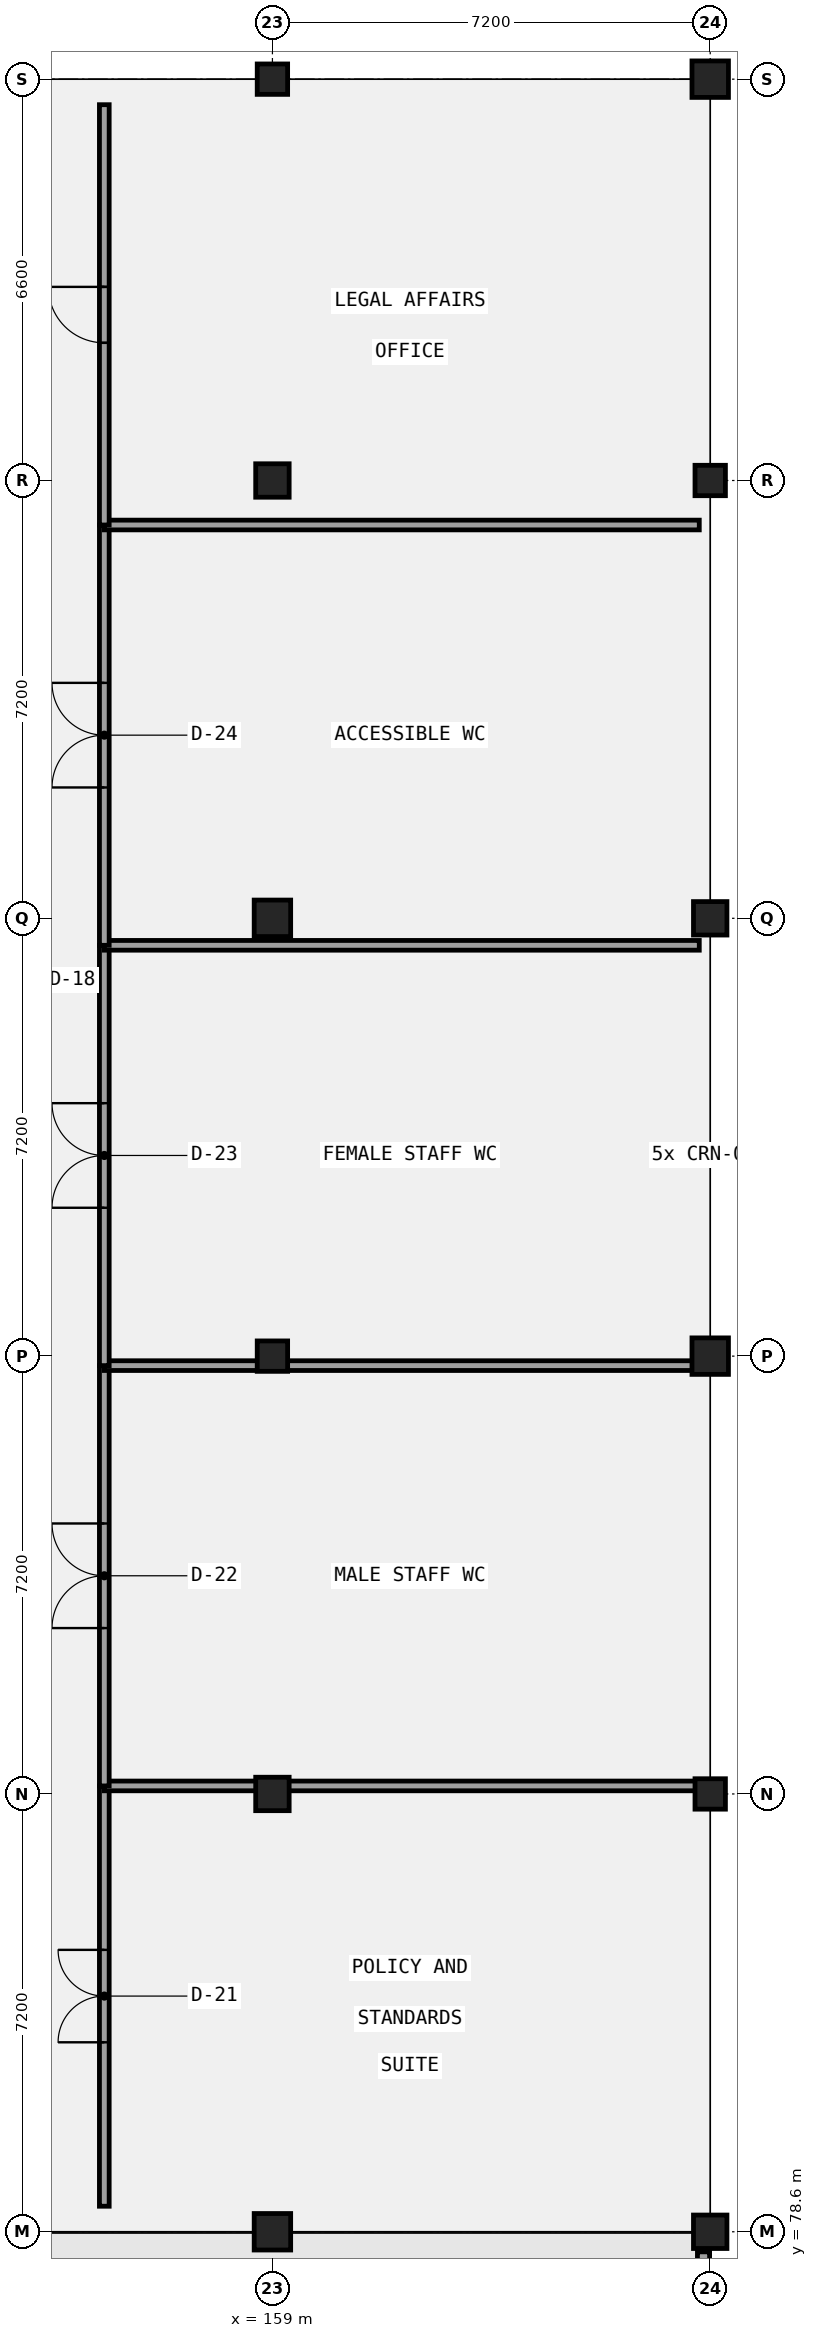
"""IFC4 building model, lengths in metres.
Left out: names, types, materials, properties, quantities, classifications, styles, units other than length and angle.
Written with IfcOpenShell. Run it as: python <this file> out.ifc"""

import sys

from ifc_helpers import new_model, si_unit, direction, frame, frame_2d, origin, origin_2d, place, context, subcontext, project, spatial, rectangle, extrude, element, fill, save


model = new_model("IFC4")
c1 = context("Model", 3, precision=1e-05, world=origin(), true_north=direction((0.0, 1.0)))
c2 = subcontext(c1, "Body", "Model", "MODEL_VIEW")
j1 = project(units=[si_unit("LENGTHUNIT", "METRE"), si_unit("PLANEANGLEUNIT", "RADIAN")], contexts=[c1])
p1 = place(None, origin())
s1 = spatial("IfcSite", under=j1, at=p1, CompositionType="ELEMENT")
p2 = place(p1, origin())
s2 = spatial("IfcBuilding", under=s1, at=p2, CompositionType="ELEMENT")
p3 = place(p2, frame((0.0, 0.0, 22.2)))
s3 = spatial("IfcBuildingStorey", under=s2, at=p3, CompositionType="ELEMENT", Elevation=22.2)
p4 = place(p3, frame((159.0, 78.6, 0.0), z_axis=(0.0, 0.0, 1.0), x_axis=(1.0, 0.0, 0.0)))
e1 = element("IfcColumn", 1, at=p4, inside=s3, PredefinedType="COLUMN", context=c2, shape_type="SweptSolid", body=[
    extrude(rectangle(XDim=0.6, YDim=0.6, at=origin_2d()), origin(), (0.0, 0.0, 1.0), 4.2),
])
p5 = place(p3, frame((159.0, 85.8, 0.0), z_axis=(0.0, 0.0, 1.0), x_axis=(1.0, 0.0, 0.0)))
e2 = element("IfcColumn", 2, at=p5, inside=s3, PredefinedType="COLUMN", context=c2, shape_type="SweptSolid", body=[
    extrude(rectangle(XDim=0.55, YDim=0.55, at=origin_2d()), origin(), (0.0, 0.0, 1.0), 4.2),
])
p6 = place(p3, frame((159.0, 93.0, 0.0), z_axis=(0.0, 0.0, 1.0), x_axis=(1.0, 0.0, 0.0)))
e3 = element("IfcColumn", 3, at=p6, inside=s3, PredefinedType="COLUMN", context=c2, shape_type="SweptSolid", body=[
    extrude(rectangle(XDim=0.5, YDim=0.5, at=origin_2d()), origin(), (0.0, 0.0, 1.0), 4.2),
])
p7 = place(p3, frame((159.0, 100.2, 0.0), z_axis=(0.0, 0.0, 1.0), x_axis=(1.0, 0.0, 0.0)))
e4 = element("IfcColumn", 4, at=p7, inside=s3, PredefinedType="COLUMN", context=c2, shape_type="SweptSolid", body=[
    extrude(rectangle(XDim=0.6, YDim=0.6, at=origin_2d()), origin(), (0.0, 0.0, 1.0), 4.2),
])
p8 = place(p3, frame((159.0, 107.4, 0.0), z_axis=(0.0, 0.0, 1.0), x_axis=(1.0, 0.0, 0.0)))
e5 = element("IfcColumn", 5, at=p8, inside=s3, PredefinedType="COLUMN", context=c2, shape_type="SweptSolid", body=[
    extrude(rectangle(XDim=0.55, YDim=0.55, at=origin_2d()), origin(), (0.0, 0.0, 1.0), 4.2),
])
p9 = place(p3, frame((159.0, 114.0, 0.0), z_axis=(0.0, 0.0, 1.0), x_axis=(1.0, 0.0, 0.0)))
e6 = element("IfcColumn", 6, at=p9, inside=s3, PredefinedType="COLUMN", context=c2, shape_type="SweptSolid", body=[
    extrude(rectangle(XDim=0.5, YDim=0.5, at=origin_2d()), origin(), (0.0, 0.0, 1.0), 4.2),
])
p10 = place(p3, frame((166.2, 78.6, 0.0), z_axis=(0.0, 0.0, 1.0), x_axis=(1.0, 0.0, 0.0)))
e7 = element("IfcColumn", 7, at=p10, inside=s3, PredefinedType="COLUMN", context=c2, shape_type="SweptSolid", body=[
    extrude(rectangle(XDim=0.55, YDim=0.55, at=origin_2d()), origin(), (0.0, 0.0, 1.0), 4.2),
])
p11 = place(p3, frame((166.2, 85.8, 0.0), z_axis=(0.0, 0.0, 1.0), x_axis=(1.0, 0.0, 0.0)))
e8 = element("IfcColumn", 8, at=p11, inside=s3, PredefinedType="COLUMN", context=c2, shape_type="SweptSolid", body=[
    extrude(rectangle(XDim=0.5, YDim=0.5, at=origin_2d()), origin(), (0.0, 0.0, 1.0), 4.2),
])
p12 = place(p3, frame((166.2, 93.0, 0.0), z_axis=(0.0, 0.0, 1.0), x_axis=(1.0, 0.0, 0.0)))
e9 = element("IfcColumn", 9, at=p12, inside=s3, PredefinedType="COLUMN", context=c2, shape_type="SweptSolid", body=[
    extrude(rectangle(XDim=0.6, YDim=0.6, at=origin_2d()), origin(), (0.0, 0.0, 1.0), 4.2),
])
p13 = place(p3, frame((166.2, 100.2, 0.0), z_axis=(0.0, 0.0, 1.0), x_axis=(1.0, 0.0, 0.0)))
e10 = element("IfcColumn", 10, at=p13, inside=s3, PredefinedType="COLUMN", context=c2, shape_type="SweptSolid", body=[
    extrude(rectangle(XDim=0.55, YDim=0.55, at=origin_2d()), origin(), (0.0, 0.0, 1.0), 4.2),
])
p14 = place(p3, frame((166.2, 107.4, 0.0), z_axis=(0.0, 0.0, 1.0), x_axis=(1.0, 0.0, 0.0)))
e11 = element("IfcColumn", 11, at=p14, inside=s3, PredefinedType="COLUMN", context=c2, shape_type="SweptSolid", body=[
    extrude(rectangle(XDim=0.5, YDim=0.5, at=origin_2d()), origin(), (0.0, 0.0, 1.0), 4.2),
])
p15 = place(p3, frame((166.2, 114.0, 0.0), z_axis=(0.0, 0.0, 1.0), x_axis=(1.0, 0.0, 0.0)))
e12 = element("IfcColumn", 12, at=p15, inside=s3, PredefinedType="COLUMN", context=c2, shape_type="SweptSolid", body=[
    extrude(rectangle(XDim=0.6, YDim=0.6, at=origin_2d()), origin(), (0.0, 0.0, 1.0), 4.2),
])
p16 = place(p3, frame((166.09, 78.27, 0.0), z_axis=(0.0, 0.0, 1.0), x_axis=(0.0, -1.0, 0.0)))
e13 = element("IfcWall", 13, at=p16, inside=s3, PredefinedType="PARAPET", context=c2, shape_type="SweptSolid", body=[
    extrude(rectangle(XDim=35.45, YDim=0.2, at=frame_2d((17.725, 0.0))), origin(), (0.0, 0.0, 1.0), 1.12),
])
p17 = place(p3, frame((156.235, 79.02, 0.0), z_axis=(0.0, 0.0, 1.0), x_axis=(0.0, 1.0, 0.0)))
e14 = element("IfcWall", 14, at=p17, inside=s3, PredefinedType="PARTITIONING", context=c2, shape_type="SweptSolid", body=[
    extrude(rectangle(XDim=6.912, YDim=0.16, at=frame_2d((3.456, 0.0))), origin(), (0.0, 0.0, 1.0), 3.92),
])
p18 = place(p17, frame((2.696, 0.0, 0.0)))
e15 = element("IfcOpeningElement", 15, at=p18, cuts=e14, PredefinedType="OPENING", context=c2, shape_type="SweptSolid", body=[
    extrude(rectangle(XDim=1.52, YDim=2.35, at=frame_2d((0.76, 1.175))), frame((0.0, 0.09, 0.0), z_axis=(0.0, -1.0, 0.0), x_axis=(1.0, 0.0, 0.0)), (0.0, 0.0, 1.0), 0.18),
])
p19 = place(p3, frame((156.235, 85.932, 0.0), z_axis=(0.0, 0.0, 1.0), x_axis=(1.0, 0.0, 0.0)))
e16 = element("IfcWall", 16, at=p19, inside=s3, PredefinedType="PARTITIONING", context=c2, shape_type="SweptSolid", body=[
    extrude(rectangle(XDim=9.785, YDim=0.16, at=frame_2d((4.893, 0.0))), origin(), (0.0, 0.0, 1.0), 2.37),
])
p20 = place(p3, frame((156.235, 85.932, 0.0), z_axis=(0.0, 0.0, 1.0), x_axis=(0.0, 1.0, 0.0)))
e17 = element("IfcWall", 17, at=p20, inside=s3, PredefinedType="PARTITIONING", context=c2, shape_type="SweptSolid", body=[
    extrude(rectangle(XDim=6.912, YDim=0.16, at=frame_2d((3.456, 0.0))), origin(), (0.0, 0.0, 1.0), 3.92),
])
p21 = place(p20, frame((2.596, 0.0, 0.0)))
e18 = element("IfcOpeningElement", 18, at=p21, cuts=e17, PredefinedType="OPENING", context=c2, shape_type="SweptSolid", body=[
    extrude(rectangle(XDim=1.72, YDim=2.1, at=frame_2d((0.86, 1.05))), frame((0.0, 0.09, 0.0), z_axis=(0.0, -1.0, 0.0), x_axis=(1.0, 0.0, 0.0)), (0.0, 0.0, 1.0), 0.18),
])
p22 = place(p3, frame((156.235, 92.844, 0.0), z_axis=(0.0, 0.0, 1.0), x_axis=(1.0, 0.0, 0.0)))
e19 = element("IfcWall", 19, at=p22, inside=s3, PredefinedType="PARTITIONING", context=c2, shape_type="SweptSolid", body=[
    extrude(rectangle(XDim=9.785, YDim=0.16, at=frame_2d((4.893, 0.0))), origin(), (0.0, 0.0, 1.0), 2.37),
])
p23 = place(p3, frame((156.235, 92.844, 0.0), z_axis=(0.0, 0.0, 1.0), x_axis=(0.0, 1.0, 0.0)))
e20 = element("IfcWall", 20, at=p23, inside=s3, PredefinedType="PARTITIONING", context=c2, shape_type="SweptSolid", body=[
    extrude(rectangle(XDim=6.912, YDim=0.16, at=frame_2d((3.456, 0.0))), origin(), (0.0, 0.0, 1.0), 3.92),
])
p24 = place(p23, frame((2.596, 0.0, 0.0)))
e21 = element("IfcOpeningElement", 21, at=p24, cuts=e20, PredefinedType="OPENING", context=c2, shape_type="SweptSolid", body=[
    extrude(rectangle(XDim=1.72, YDim=2.22, at=frame_2d((0.86, 1.11))), frame((0.0, 0.09, 0.0), z_axis=(0.0, -1.0, 0.0), x_axis=(1.0, 0.0, 0.0)), (0.0, 0.0, 1.0), 0.18),
])
p25 = place(p3, frame((156.235, 99.756, 0.0), z_axis=(0.0, 0.0, 1.0), x_axis=(1.0, 0.0, 0.0)))
e22 = element("IfcWall", 22, at=p25, inside=s3, PredefinedType="PARTITIONING", context=c2, shape_type="SweptSolid", body=[
    extrude(rectangle(XDim=9.785, YDim=0.16, at=frame_2d((4.893, 0.0))), origin(), (0.0, 0.0, 1.0), 2.37),
])
p26 = place(p3, frame((156.235, 99.756, 0.0), z_axis=(0.0, 0.0, 1.0), x_axis=(0.0, 1.0, 0.0)))
e23 = element("IfcWall", 23, at=p26, inside=s3, PredefinedType="PARTITIONING", context=c2, shape_type="SweptSolid", body=[
    extrude(rectangle(XDim=6.912, YDim=0.16, at=frame_2d((3.456, 0.0))), origin(), (0.0, 0.0, 1.0), 3.92),
])
p27 = place(p26, frame((2.596, 0.0, 0.0)))
e24 = element("IfcOpeningElement", 24, at=p27, cuts=e23, PredefinedType="OPENING", context=c2, shape_type="SweptSolid", body=[
    extrude(rectangle(XDim=1.72, YDim=2.35, at=frame_2d((0.86, 1.175))), frame((0.0, 0.09, 0.0), z_axis=(0.0, -1.0, 0.0), x_axis=(1.0, 0.0, 0.0)), (0.0, 0.0, 1.0), 0.18),
])
p28 = place(p3, frame((156.235, 106.668, 0.0), z_axis=(0.0, 0.0, 1.0), x_axis=(1.0, 0.0, 0.0)))
e25 = element("IfcWall", 25, at=p28, inside=s3, PredefinedType="PARTITIONING", context=c2, shape_type="SweptSolid", body=[
    extrude(rectangle(XDim=9.785, YDim=0.16, at=frame_2d((4.893, 0.0))), origin(), (0.0, 0.0, 1.0), 3.92),
])
p29 = place(p3, frame((156.235, 106.668, 0.0), z_axis=(0.0, 0.0, 1.0), x_axis=(0.0, 1.0, 0.0)))
e26 = element("IfcWall", 26, at=p29, inside=s3, PredefinedType="PARTITIONING", context=c2, shape_type="SweptSolid", body=[
    extrude(rectangle(XDim=6.912, YDim=0.16, at=frame_2d((3.456, 0.0))), origin(), (0.0, 0.0, 1.0), 3.92),
])
p30 = place(p29, frame((2.996, 0.0, 0.0)))
e27 = element("IfcOpeningElement", 27, at=p30, cuts=e26, PredefinedType="OPENING", context=c2, shape_type="SweptSolid", body=[
    extrude(rectangle(XDim=0.92, YDim=2.1, at=frame_2d((0.46, 1.05))), frame((0.0, 0.09, 0.0), z_axis=(0.0, -1.0, 0.0), x_axis=(1.0, 0.0, 0.0)), (0.0, 0.0, 1.0), 0.18),
])
p31 = place(p18, origin())
e28 = element("IfcDoor", 28, at=p31, inside=s3, OperationType="DOUBLE_DOOR_SINGLE_SWING", PredefinedType="DOOR", context=c2, shape_type="SweptSolid", body=[
    extrude(rectangle(XDim=1.52, YDim=2.35, at=frame_2d((0.76, 1.175))), frame((0.0, 0.025, 0.0), z_axis=(0.0, -1.0, 0.0), x_axis=(1.0, 0.0, 0.0)), (0.0, 0.0, 1.0), 0.05),
])
fill(e15, e28)
p32 = place(p21, origin())
e29 = element("IfcDoor", 29, at=p32, inside=s3, OperationType="DOUBLE_DOOR_SINGLE_SWING", PredefinedType="DOOR", context=c2, shape_type="SweptSolid", body=[
    extrude(rectangle(XDim=1.72, YDim=2.1, at=frame_2d((0.86, 1.05))), frame((0.0, 0.025, 0.0), z_axis=(0.0, -1.0, 0.0), x_axis=(1.0, 0.0, 0.0)), (0.0, 0.0, 1.0), 0.05),
])
fill(e18, e29)
p33 = place(p24, origin())
e30 = element("IfcDoor", 30, at=p33, inside=s3, OperationType="DOUBLE_DOOR_SINGLE_SWING", PredefinedType="DOOR", context=c2, shape_type="SweptSolid", body=[
    extrude(rectangle(XDim=1.72, YDim=2.22, at=frame_2d((0.86, 1.11))), frame((0.0, 0.025, 0.0), z_axis=(0.0, -1.0, 0.0), x_axis=(1.0, 0.0, 0.0)), (0.0, 0.0, 1.0), 0.05),
])
fill(e21, e30)
p34 = place(p27, origin())
e31 = element("IfcDoor", 31, at=p34, inside=s3, OperationType="DOUBLE_DOOR_SINGLE_SWING", PredefinedType="DOOR", context=c2, shape_type="SweptSolid", body=[
    extrude(rectangle(XDim=1.72, YDim=2.35, at=frame_2d((0.86, 1.175))), frame((0.0, 0.025, 0.0), z_axis=(0.0, -1.0, 0.0), x_axis=(1.0, 0.0, 0.0)), (0.0, 0.0, 1.0), 0.05),
])
fill(e24, e31)
p35 = place(p30, origin())
e32 = element("IfcDoor", 32, at=p35, inside=s3, OperationType="SINGLE_SWING_RIGHT", PredefinedType="DOOR", context=c2, shape_type="SweptSolid", body=[
    extrude(rectangle(XDim=0.92, YDim=2.1, at=frame_2d((0.46, 1.05))), frame((0.0, 0.025, 0.0), z_axis=(0.0, -1.0, 0.0), x_axis=(1.0, 0.0, 0.0)), (0.0, 0.0, 1.0), 0.05),
])
fill(e27, e32)
save(model, sys.argv[1])
